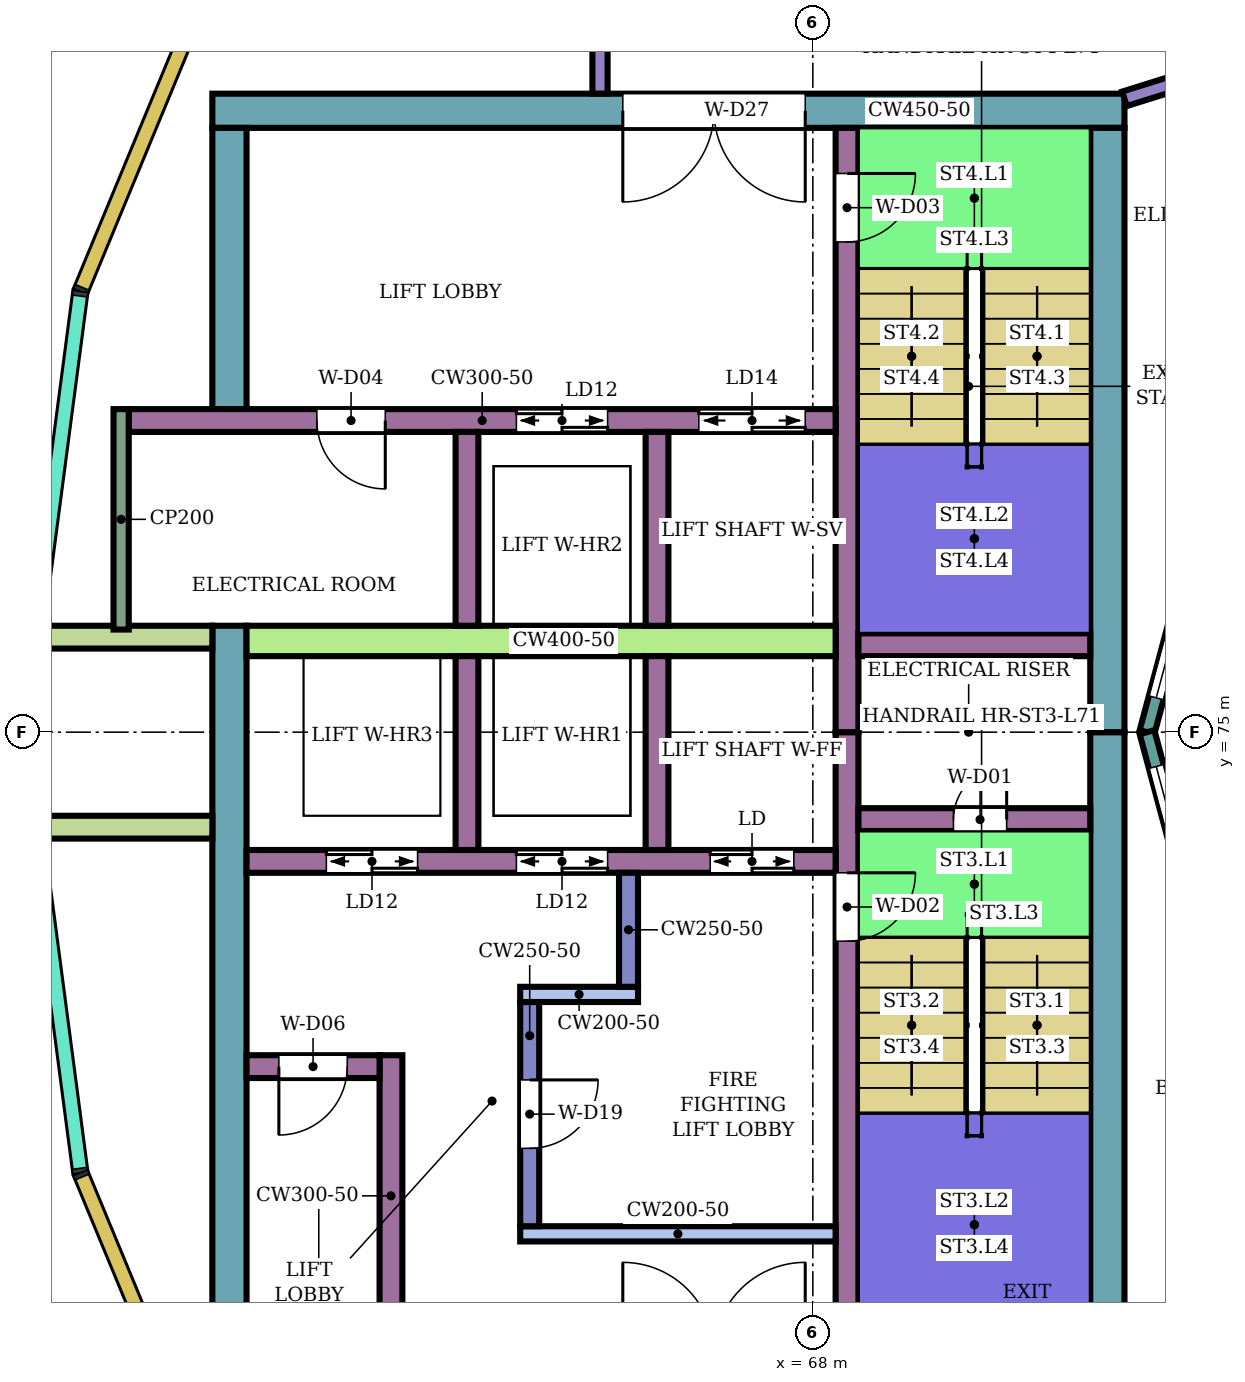
"""IFC4 building model, lengths in metres.
Left out: names, types, materials, properties, quantities, classifications, styles, units other than length and angle.
Written with IfcOpenShell. Run it as: python <this file> out.ifc"""

import sys

from ifc_helpers import new_model, si_unit, direction, frame, frame_2d, origin, place, context, subcontext, project, spatial, rectangle, extrude, element, fill, save


model = new_model("IFC4")
c1 = context("Model", 3, precision=1e-05, world=origin(), true_north=direction((0.0, 1.0)))
c2 = subcontext(c1, "Body", "Model", "MODEL_VIEW")
j1 = project(units=[si_unit("LENGTHUNIT", "METRE"), si_unit("PLANEANGLEUNIT", "RADIAN")], contexts=[c1])
p1 = place(None, origin())
s1 = spatial("IfcSite", under=j1, at=p1, CompositionType="ELEMENT")
p2 = place(p1, origin())
s2 = spatial("IfcBuilding", under=s1, at=p2, CompositionType="ELEMENT")
p3 = place(p2, frame((0.0, 0.0, 309.3)))
s3 = spatial("IfcBuildingStorey", under=s2, at=p3, CompositionType="ELEMENT", Elevation=309.3)
p4 = place(p3, frame((72.1, 83.175, 0.0), z_axis=(0.0, 0.0, 1.0), x_axis=(-1.0, 0.0, 0.0)))
e1 = element("IfcWall", 1, at=p4, inside=s3, PredefinedType="SHEAR", context=c2, shape_type="SweptSolid", body=[
    extrude(rectangle(XDim=12.0, YDim=0.45, at=frame_2d((6.0, 0.0))), origin(), (0.0, 0.0, 1.0), 5.28),
])
p5 = place(p4, frame((4.2, 0.0, 0.0)))
e2 = element("IfcOpeningElement", 2, at=p5, cuts=e1, PredefinedType="OPENING", context=c2, shape_type="SweptSolid", body=[
    extrude(rectangle(XDim=2.4, YDim=2.4, at=frame_2d((1.2, 1.2))), frame((0.0, 0.235, 0.0), z_axis=(0.0, -1.0, 0.0), x_axis=(1.0, 0.0, 0.0)), (0.0, 0.0, 1.0), 0.47),
])
for number, where, z_axis, x_axis in (
    (3, (71.875, 75.0, 0.0), (0.0, 0.0, 1.0), (0.0, -1.0, 0.0)),
    (4, (71.875, 82.95, 0.0), (0.0, 0.0, 1.0), (0.0, -1.0, 0.0)),
):
    element("IfcWall", number, at=place(p3, frame(where, z_axis=z_axis, x_axis=x_axis)), inside=s3, PredefinedType="SHEAR", context=c2, shape_type="SweptSolid", body=[
        extrude(rectangle(XDim=7.95, YDim=0.45, at=frame_2d((3.975, 0.0))), origin(), (0.0, 0.0, 1.0), 5.28),
    ])
p6 = place(p3, frame((60.325, 76.4, 0.0), z_axis=(0.0, 0.0, 1.0), x_axis=(0.0, -1.0, 0.0)))
e5 = element("IfcWall", 5, at=p6, inside=s3, PredefinedType="SHEAR", context=c2, shape_type="SweptSolid", body=[
    extrude(rectangle(XDim=9.35, YDim=0.45, at=frame_2d((4.675, 0.0))), origin(), (0.0, 0.0, 1.0), 5.28),
])
p7 = place(p3, frame((60.325, 82.95, 0.0), z_axis=(0.0, 0.0, 1.0), x_axis=(0.0, -1.0, 0.0)))
e6 = element("IfcWall", 6, at=p7, inside=s3, PredefinedType="SHEAR", context=c2, shape_type="SweptSolid", body=[
    extrude(rectangle(XDim=3.7, YDim=0.45, at=frame_2d((1.85, 0.0))), origin(), (0.0, 0.0, 1.0), 5.28),
])
p8 = place(p3, frame((68.45, 75.0, 0.0), z_axis=(0.0, 0.0, 1.0), x_axis=(0.0, -1.0, 0.0)))
e7 = element("IfcWall", 7, at=p8, inside=s3, PredefinedType="SHEAR", context=c2, shape_type="SweptSolid", body=[
    extrude(rectangle(XDim=7.95, YDim=0.3, at=frame_2d((3.975, 0.0))), origin(), (0.0, 0.0, 1.0), 5.28),
])
p9 = place(p8, frame((1.85, 0.0, 0.0)))
e8 = element("IfcOpeningElement", 8, at=p9, cuts=e7, PredefinedType="OPENING", context=c2, shape_type="SweptSolid", body=[
    extrude(rectangle(XDim=0.9, YDim=2.1, at=frame_2d((0.45, 1.05))), frame((0.0, 0.16, 0.0), z_axis=(0.0, -1.0, 0.0), x_axis=(1.0, 0.0, 0.0)), (0.0, 0.0, 1.0), 0.32),
])
p10 = place(p3, frame((68.45, 82.95, 0.0), z_axis=(0.0, 0.0, 1.0), x_axis=(0.0, -1.0, 0.0)))
e9 = element("IfcWall", 9, at=p10, inside=s3, PredefinedType="SHEAR", context=c2, shape_type="SweptSolid", body=[
    extrude(rectangle(XDim=7.95, YDim=0.3, at=frame_2d((3.975, 0.0))), origin(), (0.0, 0.0, 1.0), 5.28),
])
p11 = place(p10, frame((0.6, 0.0, 0.0)))
e10 = element("IfcOpeningElement", 10, at=p11, cuts=e9, PredefinedType="OPENING", context=c2, shape_type="SweptSolid", body=[
    extrude(rectangle(XDim=0.9, YDim=2.1, at=frame_2d((0.45, 1.05))), frame((0.0, 0.16, 0.0), z_axis=(0.0, -1.0, 0.0), x_axis=(1.0, 0.0, 0.0)), (0.0, 0.0, 1.0), 0.32),
])
p12 = place(p3, frame((71.65, 73.85, 0.0), z_axis=(0.0, 0.0, 1.0), x_axis=(-1.0, 0.0, 0.0)))
e11 = element("IfcWall", 11, at=p12, inside=s3, PredefinedType="SHEAR", context=c2, shape_type="SweptSolid", body=[
    extrude(rectangle(XDim=3.05, YDim=0.3, at=frame_2d((1.525, 0.0))), origin(), (0.0, 0.0, 1.0), 5.28),
])
p13 = place(p12, frame((1.1, 0.0, 0.0)))
e12 = element("IfcOpeningElement", 12, at=p13, cuts=e11, PredefinedType="OPENING", context=c2, shape_type="SweptSolid", body=[
    extrude(rectangle(XDim=0.7, YDim=2.0, at=frame_2d((0.35, 1.0))), frame((0.0, 0.16, 0.0), z_axis=(0.0, -1.0, 0.0), x_axis=(1.0, 0.0, 0.0)), (0.0, 0.0, 1.0), 0.32),
])
p14 = place(p3, frame((71.65, 76.15, 0.0), z_axis=(0.0, 0.0, 1.0), x_axis=(-1.0, 0.0, 0.0)))
e13 = element("IfcWall", 13, at=p14, inside=s3, PredefinedType="SHEAR", context=c2, shape_type="SweptSolid", body=[
    extrude(rectangle(XDim=3.05, YDim=0.3, at=frame_2d((1.525, 0.0))), origin(), (0.0, 0.0, 1.0), 5.28),
])
p15 = place(p3, frame((68.3, 73.3, 0.0), z_axis=(0.0, 0.0, 1.0), x_axis=(-1.0, 0.0, 0.0)))
e14 = element("IfcWall", 14, at=p15, inside=s3, PredefinedType="SHEAR", context=c2, shape_type="SweptSolid", body=[
    extrude(rectangle(XDim=7.75, YDim=0.3, at=frame_2d((3.875, 0.0))), origin(), (0.0, 0.0, 1.0), 5.28),
])
p16 = place(p15, frame((0.55, 0.0, 0.0)))
e15 = element("IfcOpeningElement", 15, at=p16, cuts=e14, PredefinedType="OPENING", context=c2, shape_type="SweptSolid", body=[
    extrude(rectangle(XDim=1.1, YDim=2.1, at=frame_2d((0.55, 1.05))), frame((0.0, 0.16, 0.0), z_axis=(0.0, -1.0, 0.0), x_axis=(1.0, 0.0, 0.0)), (0.0, 0.0, 1.0), 0.32),
])
p17 = place(p15, frame((3.0, 0.0, 0.0)))
e16 = element("IfcOpeningElement", 16, at=p17, cuts=e14, PredefinedType="OPENING", context=c2, shape_type="SweptSolid", body=[
    extrude(rectangle(XDim=1.2, YDim=2.1, at=frame_2d((0.6, 1.05))), frame((0.0, 0.16, 0.0), z_axis=(0.0, -1.0, 0.0), x_axis=(1.0, 0.0, 0.0)), (0.0, 0.0, 1.0), 0.32),
])
p18 = place(p15, frame((5.5, 0.0, 0.0)))
e17 = element("IfcOpeningElement", 17, at=p18, cuts=e14, PredefinedType="OPENING", context=c2, shape_type="SweptSolid", body=[
    extrude(rectangle(XDim=1.2, YDim=2.1, at=frame_2d((0.6, 1.05))), frame((0.0, 0.16, 0.0), z_axis=(0.0, -1.0, 0.0), x_axis=(1.0, 0.0, 0.0)), (0.0, 0.0, 1.0), 0.32),
])
p19 = place(p3, frame((68.3, 76.2, 0.0), z_axis=(0.0, 0.0, 1.0), x_axis=(-1.0, 0.0, 0.0)))
e18 = element("IfcWall", 18, at=p19, inside=s3, PredefinedType="SHEAR", context=c2, shape_type="SweptSolid", body=[
    extrude(rectangle(XDim=7.75, YDim=0.4, at=frame_2d((3.875, 0.0))), origin(), (0.0, 0.0, 1.0), 5.28),
])
p20 = place(p3, frame((68.3, 79.1, 0.0), z_axis=(0.0, 0.0, 1.0), x_axis=(-1.0, 0.0, 0.0)))
e19 = element("IfcWall", 19, at=p20, inside=s3, PredefinedType="SHEAR", context=c2, shape_type="SweptSolid", body=[
    extrude(rectangle(XDim=9.3, YDim=0.3, at=frame_2d((4.65, 0.0))), origin(), (0.0, 0.0, 1.0), 5.28),
])
p21 = place(p20, frame((0.4, 0.0, 0.0)))
e20 = element("IfcOpeningElement", 20, at=p21, cuts=e19, PredefinedType="OPENING", context=c2, shape_type="SweptSolid", body=[
    extrude(rectangle(XDim=1.4, YDim=2.1, at=frame_2d((0.7, 1.05))), frame((0.0, 0.16, 0.0), z_axis=(0.0, -1.0, 0.0), x_axis=(1.0, 0.0, 0.0)), (0.0, 0.0, 1.0), 0.32),
])
p22 = place(p20, frame((3.0, 0.0, 0.0)))
e21 = element("IfcOpeningElement", 21, at=p22, cuts=e19, PredefinedType="OPENING", context=c2, shape_type="SweptSolid", body=[
    extrude(rectangle(XDim=1.2, YDim=2.1, at=frame_2d((0.6, 1.05))), frame((0.0, 0.16, 0.0), z_axis=(0.0, -1.0, 0.0), x_axis=(1.0, 0.0, 0.0)), (0.0, 0.0, 1.0), 0.32),
])
p23 = place(p20, frame((5.925, 0.0, 0.0)))
e22 = element("IfcOpeningElement", 22, at=p23, cuts=e19, PredefinedType="OPENING", context=c2, shape_type="SweptSolid", body=[
    extrude(rectangle(XDim=0.9, YDim=2.1, at=frame_2d((0.45, 1.05))), frame((0.0, 0.16, 0.0), z_axis=(0.0, -1.0, 0.0), x_axis=(1.0, 0.0, 0.0)), (0.0, 0.0, 1.0), 0.32),
])
for number, where, z_axis, x_axis in (
    (23, (65.95, 76.0, 0.0), (0.0, 0.0, 1.0), (0.0, -1.0, 0.0)),
    (24, (63.45, 76.0, 0.0), (0.0, 0.0, 1.0), (0.0, -1.0, 0.0)),
    (25, (65.95, 78.95, 0.0), (0.0, 0.0, 1.0), (0.0, -1.0, 0.0)),
    (26, (63.45, 78.95, 0.0), (0.0, 0.0, 1.0), (0.0, -1.0, 0.0)),
):
    element("IfcWall", number, at=place(p3, frame(where, z_axis=z_axis, x_axis=x_axis)), inside=s3, PredefinedType="SHEAR", context=c2, shape_type="SweptSolid", body=[
        extrude(rectangle(XDim=2.55, YDim=0.3, at=frame_2d((1.275, 0.0))), origin(), (0.0, 0.0, 1.0), 5.28),
    ])
p24 = place(p3, frame((68.3, 68.4, 0.0), z_axis=(0.0, 0.0, 1.0), x_axis=(-1.0, 0.0, 0.0)))
e27 = element("IfcWall", 27, at=p24, inside=s3, PredefinedType="SHEAR", context=c2, shape_type="SweptSolid", body=[
    extrude(rectangle(XDim=4.15, YDim=0.2, at=frame_2d((2.075, 0.0))), origin(), (0.0, 0.0, 1.0), 5.28),
])
p25 = place(p3, frame((64.275, 71.45, 0.0), z_axis=(0.0, 0.0, 1.0), x_axis=(0.0, -1.0, 0.0)))
e28 = element("IfcWall", 28, at=p25, inside=s3, PredefinedType="SHEAR", context=c2, shape_type="SweptSolid", body=[
    extrude(rectangle(XDim=2.95, YDim=0.25, at=frame_2d((1.475, 0.0))), origin(), (0.0, 0.0, 1.0), 5.28),
])
p26 = place(p25, frame((1.025, 0.0, 0.0)))
e29 = element("IfcOpeningElement", 29, at=p26, cuts=e28, PredefinedType="OPENING", context=c2, shape_type="SweptSolid", body=[
    extrude(rectangle(XDim=0.9, YDim=2.1, at=frame_2d((0.45, 1.05))), frame((0.0, 0.135, 0.0), z_axis=(0.0, -1.0, 0.0), x_axis=(1.0, 0.0, 0.0)), (0.0, 0.0, 1.0), 0.27),
])
p27 = place(p3, frame((65.7, 71.55, 0.0), z_axis=(0.0, 0.0, 1.0), x_axis=(-1.0, 0.0, 0.0)))
e30 = element("IfcWall", 30, at=p27, inside=s3, PredefinedType="SHEAR", context=c2, shape_type="SweptSolid", body=[
    extrude(rectangle(XDim=1.55, YDim=0.2, at=frame_2d((0.775, 0.0))), origin(), (0.0, 0.0, 1.0), 5.28),
])
p28 = place(p3, frame((65.575, 73.15, 0.0), z_axis=(0.0, 0.0, 1.0), x_axis=(0.0, -1.0, 0.0)))
e31 = element("IfcWall", 31, at=p28, inside=s3, PredefinedType="SHEAR", context=c2, shape_type="SweptSolid", body=[
    extrude(rectangle(XDim=1.5, YDim=0.25, at=frame_2d((0.75, 0.0))), origin(), (0.0, 0.0, 1.0), 5.28),
])
p29 = place(p3, frame((62.45, 70.75, 0.0), z_axis=(0.0, 0.0, 1.0), x_axis=(0.0, -1.0, 0.0)))
e32 = element("IfcWall", 32, at=p29, inside=s3, PredefinedType="SHEAR", context=c2, shape_type="SweptSolid", body=[
    extrude(rectangle(XDim=3.7, YDim=0.3, at=frame_2d((1.85, 0.0))), origin(), (0.0, 0.0, 1.0), 5.28),
])
p30 = place(p3, frame((62.3, 70.6, 0.0), z_axis=(0.0, 0.0, 1.0), x_axis=(-1.0, 0.0, 0.0)))
e33 = element("IfcWall", 33, at=p30, inside=s3, PredefinedType="SHEAR", context=c2, shape_type="SweptSolid", body=[
    extrude(rectangle(XDim=1.75, YDim=0.3, at=frame_2d((0.875, 0.0))), origin(), (0.0, 0.0, 1.0), 5.28),
])
p31 = place(p30, frame((0.425, 0.0, 0.0)))
e34 = element("IfcOpeningElement", 34, at=p31, cuts=e33, PredefinedType="OPENING", context=c2, shape_type="SweptSolid", body=[
    extrude(rectangle(XDim=0.9, YDim=2.1, at=frame_2d((0.45, 1.05))), frame((0.0, 0.16, 0.0), z_axis=(0.0, -1.0, 0.0), x_axis=(1.0, 0.0, 0.0)), (0.0, 0.0, 1.0), 0.32),
])
for number, where, z_axis, x_axis in (
    (35, (60.1, 76.25, 0.0), (0.0, 0.0, 1.0), (-1.0, 0.0, 0.0)),
    (36, (60.1, 73.75, 0.0), (0.0, 0.0, 1.0), (-1.0, 0.0, 0.0)),
):
    element("IfcWall", number, at=place(p3, frame(where, z_axis=z_axis, x_axis=x_axis)), inside=s3, PredefinedType="NOTDEFINED", context=c2, shape_type="SweptSolid", body=[
        extrude(rectangle(XDim=2.416, YDim=0.3, at=frame_2d((1.208, 0.0))), origin(), (0.0, 0.0, 1.0), 5.6),
    ])
p32 = place(p3, frame((73.415, 78.802, 0.0), z_axis=(0.0, 0.0, 1.0), x_axis=(-0.258789828301, -0.965933654434, 0.0)))
e37 = element("IfcWall", 37, at=p32, inside=s3, PredefinedType="NOTDEFINED", context=c2, shape_type="SweptSolid", body=[
    extrude(rectangle(XDim=3.936, YDim=0.2, at=frame_2d((1.968, 0.0))), origin(), (0.0, 0.0, 1.0), 5.6),
])
p33 = place(p32, frame((0.468, 0.0, 0.9)))
e38 = element("IfcOpeningElement", 38, at=p33, cuts=e37, PredefinedType="OPENING", context=c2, shape_type="SweptSolid", body=[
    extrude(rectangle(XDim=3.0, YDim=2.3, at=frame_2d((1.5, 1.15))), frame((0.0, 0.11, 0.0), z_axis=(0.0, -1.0, 0.0), x_axis=(1.0, 0.0, 0.0)), (0.0, 0.0, 1.0), 0.22),
])
p34 = place(p3, frame((72.396, 75.0, 0.0), z_axis=(0.0, 0.0, 1.0), x_axis=(0.258789828301, -0.965933654434, 0.0)))
e39 = element("IfcWall", 39, at=p34, inside=s3, PredefinedType="NOTDEFINED", context=c2, shape_type="SweptSolid", body=[
    extrude(rectangle(XDim=3.936, YDim=0.2, at=frame_2d((1.968, 0.0))), origin(), (0.0, 0.0, 1.0), 5.6),
])
p35 = place(p34, frame((0.468, 0.0, 0.9)))
e40 = element("IfcOpeningElement", 40, at=p35, cuts=e39, PredefinedType="OPENING", context=c2, shape_type="SweptSolid", body=[
    extrude(rectangle(XDim=3.0, YDim=2.3, at=frame_2d((1.5, 1.15))), frame((0.0, 0.11, 0.0), z_axis=(0.0, -1.0, 0.0), x_axis=(1.0, 0.0, 0.0)), (0.0, 0.0, 1.0), 0.22),
])
p36 = place(p3, frame((65.2, 83.401, 0.0), z_axis=(0.0, 0.0, 1.0), x_axis=(0.0, 1.0, 0.0)))
e41 = element("IfcWall", 41, at=p36, inside=s3, PredefinedType="PARTITIONING", context=c2, shape_type="SweptSolid", body=[
    extrude(rectangle(XDim=1.399, YDim=0.2, at=frame_2d((0.7, 0.0))), origin(), (0.0, 0.0, 1.0), 5.15),
])
p37 = place(p3, frame((72.1, 83.332, 0.0), z_axis=(0.0, 0.0, 1.0), x_axis=(0.954233106619, 0.299063836383, 0.0)))
e42 = element("IfcWall", 42, at=p37, inside=s3, PredefinedType="PARTITIONING", context=c2, shape_type="SweptSolid", body=[
    extrude(rectangle(XDim=2.414, YDim=0.2, at=frame_2d((1.207, 0.0))), origin(), (0.0, 0.0, 1.0), 5.15),
])
p38 = place(p37, frame((0.612, 0.0, 0.0)))
e43 = element("IfcOpeningElement", 43, at=p38, cuts=e42, PredefinedType="OPENING", context=c2, shape_type="SweptSolid", body=[
    extrude(rectangle(XDim=1.2, YDim=2.4, at=frame_2d((0.6, 1.2))), frame((0.0, 0.11, 0.0), z_axis=(0.0, -1.0, 0.0), x_axis=(1.0, 0.0, 0.0)), (0.0, 0.0, 1.0), 0.22),
])
p39 = place(p3, frame((58.9, 79.25, 0.0), z_axis=(0.0, 0.0, 1.0), x_axis=(0.0, -1.0, 0.0)))
e44 = element("IfcWall", 44, at=p39, inside=s3, PredefinedType="PARTITIONING", context=c2, shape_type="SweptSolid", body=[
    extrude(rectangle(XDim=2.9, YDim=0.2, at=frame_2d((1.45, 0.0))), origin(), (0.0, 0.0, 1.0), 5.28),
])
p40 = place(p33, origin())
e45 = element("IfcWindow", 45, at=p40, inside=s3, PartitioningType="SINGLE_PANEL", PredefinedType="WINDOW", context=c2, shape_type="SweptSolid", body=[
    extrude(rectangle(XDim=3.0, YDim=2.3, at=frame_2d((1.5, 1.15))), frame((0.0, 0.03, 0.0), z_axis=(0.0, -1.0, 0.0), x_axis=(1.0, 0.0, 0.0)), (0.0, 0.0, 1.0), 0.06),
])
fill(e38, e45)
p41 = place(p35, origin())
e46 = element("IfcWindow", 46, at=p41, inside=s3, PartitioningType="SINGLE_PANEL", PredefinedType="WINDOW", context=c2, shape_type="SweptSolid", body=[
    extrude(rectangle(XDim=3.0, YDim=2.3, at=frame_2d((1.5, 1.15))), frame((0.0, 0.03, 0.0), z_axis=(0.0, -1.0, 0.0), x_axis=(1.0, 0.0, 0.0)), (0.0, 0.0, 1.0), 0.06),
])
fill(e40, e46)
p42 = place(p13, frame((0.7, 0.0, 0.0), z_axis=(0.0, 0.0, 1.0), x_axis=(-1.0, 0.0, 0.0)))
e47 = element("IfcDoor", 47, at=p42, inside=s3, OperationType="SINGLE_SWING_RIGHT", PredefinedType="DOOR", context=c2, shape_type="SweptSolid", body=[
    extrude(rectangle(XDim=0.7, YDim=2.0, at=frame_2d((0.35, 1.0))), frame((0.0, 0.025, 0.0), z_axis=(0.0, -1.0, 0.0), x_axis=(1.0, 0.0, 0.0)), (0.0, 0.0, 1.0), 0.05),
])
fill(e12, e47)
p43 = place(p9, origin())
e48 = element("IfcDoor", 48, at=p43, inside=s3, OperationType="SINGLE_SWING_LEFT", PredefinedType="DOOR", context=c2, shape_type="SweptSolid", body=[
    extrude(rectangle(XDim=0.9, YDim=2.1, at=frame_2d((0.45, 1.05))), frame((0.0, 0.025, 0.0), z_axis=(0.0, -1.0, 0.0), x_axis=(1.0, 0.0, 0.0)), (0.0, 0.0, 1.0), 0.05),
])
fill(e8, e48)
p44 = place(p11, origin())
e49 = element("IfcDoor", 49, at=p44, inside=s3, OperationType="SINGLE_SWING_LEFT", PredefinedType="DOOR", context=c2, shape_type="SweptSolid", body=[
    extrude(rectangle(XDim=0.9, YDim=2.1, at=frame_2d((0.45, 1.05))), frame((0.0, 0.025, 0.0), z_axis=(0.0, -1.0, 0.0), x_axis=(1.0, 0.0, 0.0)), (0.0, 0.0, 1.0), 0.05),
])
fill(e10, e49)
p45 = place(p16, origin())
e50 = element("IfcDoor", 50, at=p45, inside=s3, OperationType="DOUBLE_DOOR_SLIDING", PredefinedType="DOOR", context=c2, shape_type="SweptSolid", body=[
    extrude(rectangle(XDim=1.1, YDim=2.1, at=frame_2d((0.55, 1.05))), frame((0.0, 0.025, 0.0), z_axis=(0.0, -1.0, 0.0), x_axis=(1.0, 0.0, 0.0)), (0.0, 0.0, 1.0), 0.05),
])
fill(e15, e50)
p46 = place(p17, origin())
e51 = element("IfcDoor", 51, at=p46, inside=s3, OperationType="DOUBLE_DOOR_SLIDING", PredefinedType="DOOR", context=c2, shape_type="SweptSolid", body=[
    extrude(rectangle(XDim=1.2, YDim=2.1, at=frame_2d((0.6, 1.05))), frame((0.0, 0.025, 0.0), z_axis=(0.0, -1.0, 0.0), x_axis=(1.0, 0.0, 0.0)), (0.0, 0.0, 1.0), 0.05),
])
fill(e16, e51)
p47 = place(p18, origin())
e52 = element("IfcDoor", 52, at=p47, inside=s3, OperationType="DOUBLE_DOOR_SLIDING", PredefinedType="DOOR", context=c2, shape_type="SweptSolid", body=[
    extrude(rectangle(XDim=1.2, YDim=2.1, at=frame_2d((0.6, 1.05))), frame((0.0, 0.025, 0.0), z_axis=(0.0, -1.0, 0.0), x_axis=(1.0, 0.0, 0.0)), (0.0, 0.0, 1.0), 0.05),
])
fill(e17, e52)
p48 = place(p21, origin())
e53 = element("IfcDoor", 53, at=p48, inside=s3, OperationType="DOUBLE_DOOR_SLIDING", PredefinedType="DOOR", context=c2, shape_type="SweptSolid", body=[
    extrude(rectangle(XDim=1.4, YDim=2.1, at=frame_2d((0.7, 1.05))), frame((0.0, 0.025, 0.0), z_axis=(0.0, -1.0, 0.0), x_axis=(1.0, 0.0, 0.0)), (0.0, 0.0, 1.0), 0.05),
])
fill(e20, e53)
p49 = place(p22, origin())
e54 = element("IfcDoor", 54, at=p49, inside=s3, OperationType="DOUBLE_DOOR_SLIDING", PredefinedType="DOOR", context=c2, shape_type="SweptSolid", body=[
    extrude(rectangle(XDim=1.2, YDim=2.1, at=frame_2d((0.6, 1.05))), frame((0.0, 0.025, 0.0), z_axis=(0.0, -1.0, 0.0), x_axis=(1.0, 0.0, 0.0)), (0.0, 0.0, 1.0), 0.05),
])
fill(e21, e54)
p50 = place(p23, origin())
e55 = element("IfcDoor", 55, at=p50, inside=s3, OperationType="SINGLE_SWING_LEFT", PredefinedType="DOOR", context=c2, shape_type="SweptSolid", body=[
    extrude(rectangle(XDim=0.9, YDim=2.1, at=frame_2d((0.45, 1.05))), frame((0.0, 0.025, 0.0), z_axis=(0.0, -1.0, 0.0), x_axis=(1.0, 0.0, 0.0)), (0.0, 0.0, 1.0), 0.05),
])
fill(e22, e55)
p51 = place(p26, origin())
e56 = element("IfcDoor", 56, at=p51, inside=s3, OperationType="SINGLE_SWING_LEFT", PredefinedType="DOOR", context=c2, shape_type="SweptSolid", body=[
    extrude(rectangle(XDim=0.9, YDim=2.1, at=frame_2d((0.45, 1.05))), frame((0.0, 0.025, 0.0), z_axis=(0.0, -1.0, 0.0), x_axis=(1.0, 0.0, 0.0)), (0.0, 0.0, 1.0), 0.05),
])
fill(e29, e56)
p52 = place(p31, origin())
e57 = element("IfcDoor", 57, at=p52, inside=s3, OperationType="SINGLE_SWING_RIGHT", PredefinedType="DOOR", context=c2, shape_type="SweptSolid", body=[
    extrude(rectangle(XDim=0.9, YDim=2.1, at=frame_2d((0.45, 1.05))), frame((0.0, 0.025, 0.0), z_axis=(0.0, -1.0, 0.0), x_axis=(1.0, 0.0, 0.0)), (0.0, 0.0, 1.0), 0.05),
])
fill(e34, e57)
p53 = place(p5, origin())
e58 = element("IfcDoor", 58, at=p53, inside=s3, OperationType="DOUBLE_DOOR_SINGLE_SWING", PredefinedType="DOOR", context=c2, shape_type="SweptSolid", body=[
    extrude(rectangle(XDim=2.4, YDim=2.4, at=frame_2d((1.2, 1.2))), frame((0.0, 0.025, 0.0), z_axis=(0.0, -1.0, 0.0), x_axis=(1.0, 0.0, 0.0)), (0.0, 0.0, 1.0), 0.05),
])
fill(e2, e58)
save(model, sys.argv[1])
